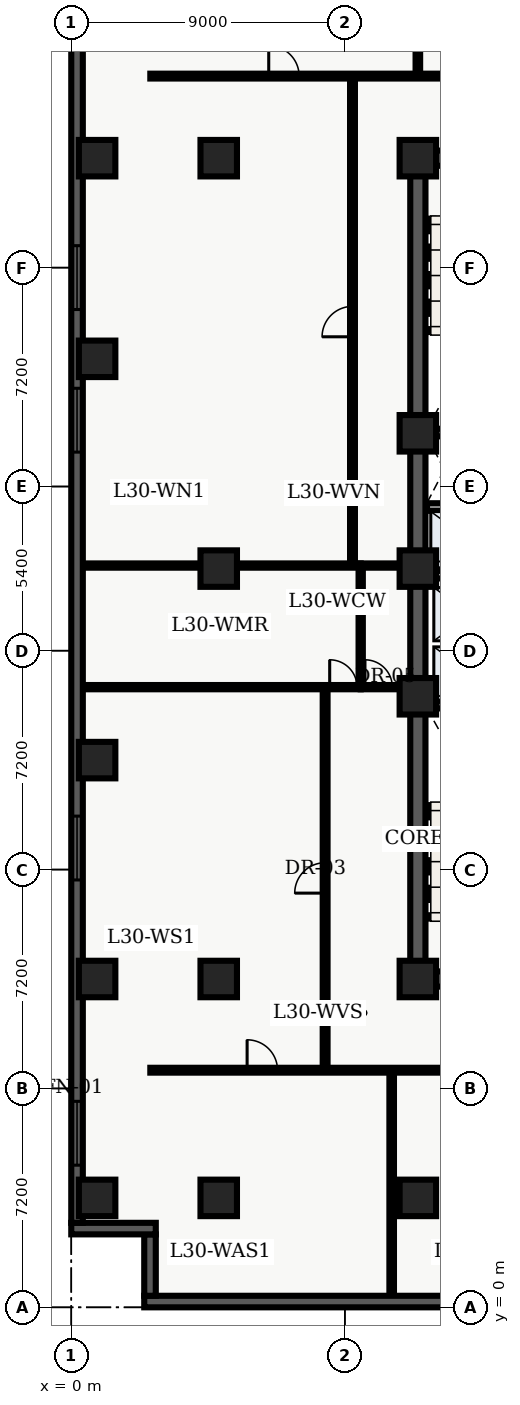
"""IFC4 building model, lengths in metres.
Left out: names, types, materials, properties, quantities, classifications, styles, units other than length and angle.
Written with IfcOpenShell. Run it as: python <this file> out.ifc"""

import sys

from ifc_helpers import new_model, entity, si_unit, converted_unit, direction, frame, origin_with_axes, origin_2d_with_axis, place, context, subcontext, project, spatial, polyline, rectangle, outline, extrude, element, fill, save


model = new_model("IFC4")
c1 = context("Model", 3, precision=1e-05, world=origin_with_axes(), true_north=direction((0.0, 1.0)))
c2 = subcontext(c1, "Body", "Model", "MODEL_VIEW")
j1 = project(units=[si_unit("LENGTHUNIT", "METRE"), converted_unit("PLANEANGLEUNIT", "DEGREE", entity("IfcPlaneAngleMeasure", 0.017), si_unit("PLANEANGLEUNIT", "RADIAN"), dimensions=[0, 0, 0, 0, 0, 0, 0])], contexts=[c1])
p1 = place(None, origin_with_axes())
s1 = spatial("IfcSite", under=j1, at=p1, CompositionType="ELEMENT")
p2 = place(p1, origin_with_axes())
s2 = spatial("IfcBuilding", under=s1, at=p2, CompositionType="ELEMENT")
p3 = place(p2, frame((0.0, 0.0, 124.2), z_axis=(0.0, 0.0, 1.0), x_axis=(1.0, 0.0, 0.0)))
s3 = spatial("IfcBuildingStorey", under=s2, at=p3, CompositionType="ELEMENT", Elevation=124.2)
p4 = place(p3, frame((11.4, 10.8, 0.0), z_axis=(0.0, 0.0, 1.0), x_axis=(0.0, 1.0, 0.0)))
e1 = element("IfcWall", 1, at=p4, inside=s3, PredefinedType="SHEAR", context=c2, shape_type="SweptSolid", body=[
    extrude(outline(polyline([(0.0, -0.25), (27.0, -0.25), (27.0, 0.25), (0.0, 0.25), (0.0, -0.25)])), origin_with_axes(), (0.0, 0.0, 1.0), 4.56),
])
p5 = place(p3, frame((11.4, 10.8, 0.0), z_axis=(0.0, 0.0, 1.0), x_axis=(1.0, 0.0, 0.0)))
e2 = element("IfcWall", 2, at=p5, inside=s3, PredefinedType="SHEAR", context=c2, shape_type="SweptSolid", body=[
    extrude(outline(polyline([(0.0, -0.25), (7.2, -0.25), (7.2, 0.25), (0.0, 0.25), (0.0, -0.25)])), origin_with_axes(), (0.0, 0.0, 1.0), 4.56),
])
p6 = place(p5, frame((2.625, 0.0, 0.0), z_axis=(0.0, 0.0, 1.0), x_axis=(1.0, 0.0, 0.0)))
e3 = element("IfcOpeningElement", 3, at=p6, cuts=e2, PredefinedType="OPENING", context=c2, shape_type="SweptSolid", body=[
    extrude(rectangle(XDim=1.05, YDim=0.52, at=origin_2d_with_axis()), origin_with_axes(), (0.0, 0.0, 1.0), 2.15),
])
p7 = place(p3, frame((11.4, 37.8, 0.0), z_axis=(0.0, 0.0, 1.0), x_axis=(1.0, 0.0, 0.0)))
e4 = element("IfcWall", 4, at=p7, inside=s3, PredefinedType="SHEAR", context=c2, shape_type="SweptSolid", body=[
    extrude(outline(polyline([(0.0, -0.25), (7.2, -0.25), (7.2, 0.25), (0.0, 0.25), (0.0, -0.25)])), origin_with_axes(), (0.0, 0.0, 1.0), 4.56),
])
p8 = place(p7, frame((2.625, 0.0, 0.0), z_axis=(0.0, 0.0, 1.0), x_axis=(1.0, 0.0, 0.0)))
e5 = element("IfcOpeningElement", 5, at=p8, cuts=e4, PredefinedType="OPENING", context=c2, shape_type="SweptSolid", body=[
    extrude(rectangle(XDim=1.05, YDim=0.52, at=origin_2d_with_axis()), origin_with_axes(), (0.0, 0.0, 1.0), 2.15),
])
for number, where, z_axis, x_axis in (
    (6, (11.65, 19.825, 0.0), (0.0, 0.0, 1.0), (1.0, 0.0, 0.0)),
    (7, (11.65, 28.775, 0.0), (0.0, 0.0, 1.0), (1.0, 0.0, 0.0)),
):
    element("IfcWall", number, at=place(p3, frame(where, z_axis=z_axis, x_axis=x_axis)), inside=s3, PredefinedType="SHEAR", context=c2, shape_type="SweptSolid", body=[
        extrude(outline(polyline([(0.0, -0.125), (6.7, -0.125), (6.7, 0.125), (0.0, 0.125), (0.0, -0.125)])), origin_with_axes(), (0.0, 0.0, 1.0), 4.56),
    ])
p9 = place(p3, frame((11.7, 24.1, 0.0), z_axis=(0.0, 0.0, 1.0), x_axis=(1.0, 0.0, 0.0)))
e8 = element("IfcWall", 8, at=p9, inside=s3, PredefinedType="SOLIDWALL", context=c2, shape_type="SweptSolid", body=[
    extrude(outline(polyline([(0.0, -0.125), (6.6, -0.125), (6.6, 0.125), (0.0, 0.125), (0.0, -0.125)])), origin_with_axes(), (0.0, 0.0, 1.0), 3.6),
])
p10 = place(p9, frame((3.75, 0.0, 0.0), z_axis=(0.0, 0.0, 1.0), x_axis=(1.0, 0.0, 0.0)))
e9 = element("IfcOpeningElement", 9, at=p10, cuts=e8, PredefinedType="OPENING", context=c2, shape_type="SweptSolid", body=[
    extrude(rectangle(XDim=0.9, YDim=0.27, at=origin_2d_with_axis()), origin_with_axes(), (0.0, 0.0, 1.0), 2.15),
])
p11 = place(p3, frame((11.7, 26.325, 0.0), z_axis=(0.0, 0.0, 1.0), x_axis=(1.0, 0.0, 0.0)))
e10 = element("IfcWall", 10, at=p11, inside=s3, PredefinedType="SOLIDWALL", context=c2, shape_type="SweptSolid", body=[
    extrude(outline(polyline([(0.0, -0.125), (6.6, -0.125), (6.6, 0.125), (0.0, 0.125), (0.0, -0.125)])), origin_with_axes(), (0.0, 0.0, 1.0), 3.6),
])
p12 = place(p11, frame((3.5, 0.0, 0.0), z_axis=(0.0, 0.0, 1.0), x_axis=(1.0, 0.0, 0.0)))
e11 = element("IfcOpeningElement", 11, at=p12, cuts=e10, PredefinedType="OPENING", context=c2, shape_type="SweptSolid", body=[
    extrude(rectangle(XDim=0.9, YDim=0.27, at=origin_2d_with_axis()), origin_with_axes(), (0.0, 0.0, 1.0), 2.15),
])
for number, where, z_axis, x_axis in (
    (12, (11.4, 3.6, 0.0), (0.0, 0.0, 1.0), (1.0, 0.0, 0.0)),
    (13, (11.4, 10.8, 0.0), (0.0, 0.0, 1.0), (1.0, 0.0, 0.0)),
    (14, (11.4, 20.1, 0.0), (0.0, 0.0, 1.0), (1.0, 0.0, 0.0)),
    (15, (11.4, 24.3, 0.0), (0.0, 0.0, 1.0), (1.0, 0.0, 0.0)),
    (16, (11.4, 28.75, 0.0), (0.0, 0.0, 1.0), (1.0, 0.0, 0.0)),
    (17, (11.4, 37.8, 0.0), (0.0, 0.0, 1.0), (1.0, 0.0, 0.0)),
    (18, (4.85, 3.6, 0.0), (0.0, 0.0, 1.0), (1.0, 0.0, 0.0)),
    (19, (4.85, 10.8, 0.0), (0.0, 0.0, 1.0), (1.0, 0.0, 0.0)),
    (20, (4.85, 24.3, 0.0), (0.0, 0.0, 1.0), (1.0, 0.0, 0.0)),
    (21, (4.85, 37.8, 0.0), (0.0, 0.0, 1.0), (1.0, 0.0, 0.0)),
    (22, (0.85, 3.6, 0.0), (0.0, 0.0, 1.0), (1.0, 0.0, 0.0)),
    (23, (0.85, 10.8, 0.0), (0.0, 0.0, 1.0), (1.0, 0.0, 0.0)),
    (24, (0.85, 18.0, 0.0), (0.0, 0.0, 1.0), (1.0, 0.0, 0.0)),
    (25, (0.85, 31.2, 0.0), (0.0, 0.0, 1.0), (1.0, 0.0, 0.0)),
    (26, (0.85, 37.8, 0.0), (0.0, 0.0, 1.0), (1.0, 0.0, 0.0)),
):
    element("IfcColumn", number, at=place(p3, frame(where, z_axis=z_axis, x_axis=x_axis)), inside=s3, PredefinedType="COLUMN", context=c2, shape_type="SweptSolid", body=[
        extrude(rectangle(XDim=1.2, YDim=1.2, at=origin_2d_with_axis()), origin_with_axes(), (0.0, 0.0, 1.0), 4.8),
    ])
p13 = place(p3, frame((9.52, 20.4, 0.0), z_axis=(0.0, 0.0, 1.0), x_axis=(0.0, 1.0, 0.0)))
e27 = element("IfcWall", 27, at=p13, inside=s3, PredefinedType="PARTITIONING", context=c2, shape_type="SweptSolid", body=[
    extrude(outline(polyline([(0.0, -0.07), (4.0, -0.07), (4.0, 0.07), (0.0, 0.07), (0.0, -0.07)])), origin_with_axes(), (0.0, 0.0, 1.0), 3.2),
])
p14 = place(p3, frame((9.52, 20.4, 0.0), z_axis=(0.0, 0.0, 1.0), x_axis=(1.0, 0.0, 0.0)))
e28 = element("IfcWall", 28, at=p14, inside=s3, PredefinedType="PARTITIONING", context=c2, shape_type="SweptSolid", body=[
    extrude(outline(polyline([(0.0, -0.07), (1.58, -0.07), (1.58, 0.07), (0.0, 0.07), (0.0, -0.07)])), origin_with_axes(), (0.0, 0.0, 1.0), 3.2),
])
p15 = place(p14, frame((0.59, 0.0, 0.0), z_axis=(0.0, 0.0, 1.0), x_axis=(1.0, 0.0, 0.0)))
e29 = element("IfcOpeningElement", 29, at=p15, cuts=e28, PredefinedType="OPENING", context=c2, shape_type="SweptSolid", body=[
    extrude(rectangle(XDim=0.9, YDim=0.16, at=origin_2d_with_axis()), origin_with_axes(), (0.0, 0.0, 1.0), 2.15),
])
p16 = place(p3, frame((9.52, 24.4, 0.0), z_axis=(0.0, 0.0, 1.0), x_axis=(1.0, 0.0, 0.0)))
e30 = element("IfcWall", 30, at=p16, inside=s3, PredefinedType="PARTITIONING", context=c2, shape_type="SweptSolid", body=[
    extrude(outline(polyline([(0.0, -0.07), (1.58, -0.07), (1.58, 0.07), (0.0, 0.07), (0.0, -0.07)])), origin_with_axes(), (0.0, 0.0, 1.0), 3.2),
])
p17 = place(p3, frame((2.6, 7.8, 0.0), z_axis=(0.0, 0.0, 1.0), x_axis=(1.0, 0.0, 0.0)))
e31 = element("IfcWall", 31, at=p17, inside=s3, PredefinedType="PARTITIONING", context=c2, shape_type="SweptSolid", body=[
    extrude(outline(polyline([(0.0, -0.08), (18.55, -0.08), (18.55, 0.08), (0.0, 0.08), (0.0, -0.08)])), origin_with_axes(), (0.0, 0.0, 1.0), 3.2),
])
p18 = place(p17, frame((3.684, 0.0, 0.0), z_axis=(0.0, 0.0, 1.0), x_axis=(1.0, 0.0, 0.0)))
e32 = element("IfcOpeningElement", 32, at=p18, cuts=e31, PredefinedType="OPENING", context=c2, shape_type="SweptSolid", body=[
    extrude(rectangle(XDim=1.0, YDim=0.18, at=origin_2d_with_axis()), origin_with_axes(), (0.0, 0.0, 1.0), 2.15),
])
p19 = place(p17, frame((13.22, 0.0, 0.0), z_axis=(0.0, 0.0, 1.0), x_axis=(1.0, 0.0, 0.0)))
e33 = element("IfcOpeningElement", 33, at=p19, cuts=e31, PredefinedType="OPENING", context=c2, shape_type="SweptSolid", body=[
    extrude(rectangle(XDim=1.0, YDim=0.18, at=origin_2d_with_axis()), origin_with_axes(), (0.0, 0.0, 1.0), 2.15),
])
p20 = place(p3, frame((2.6, 40.5, 0.0), z_axis=(0.0, 0.0, 1.0), x_axis=(1.0, 0.0, 0.0)))
e34 = element("IfcWall", 34, at=p20, inside=s3, PredefinedType="PARTITIONING", context=c2, shape_type="SweptSolid", body=[
    extrude(outline(polyline([(0.0, -0.08), (18.65, -0.08), (18.65, 0.08), (0.0, 0.08), (0.0, -0.08)])), origin_with_axes(), (0.0, 0.0, 1.0), 3.2),
])
p21 = place(p20, frame((4.395, 0.0, 0.0), z_axis=(0.0, 0.0, 1.0), x_axis=(1.0, 0.0, 0.0)))
e35 = element("IfcOpeningElement", 35, at=p21, cuts=e34, PredefinedType="OPENING", context=c2, shape_type="SweptSolid", body=[
    extrude(rectangle(XDim=1.0, YDim=0.18, at=origin_2d_with_axis()), origin_with_axes(), (0.0, 0.0, 1.0), 2.15),
])
p22 = place(p20, frame((12.61, 0.0, 0.0), z_axis=(0.0, 0.0, 1.0), x_axis=(1.0, 0.0, 0.0)))
e36 = element("IfcOpeningElement", 36, at=p22, cuts=e34, PredefinedType="OPENING", context=c2, shape_type="SweptSolid", body=[
    extrude(rectangle(XDim=1.0, YDim=0.18, at=origin_2d_with_axis()), origin_with_axes(), (0.0, 0.0, 1.0), 2.15),
])
p23 = place(p3, frame((8.35, 7.8, 0.0), z_axis=(0.0, 0.0, 1.0), x_axis=(0.0, 1.0, 0.0)))
e37 = element("IfcWall", 37, at=p23, inside=s3, PredefinedType="PARTITIONING", context=c2, shape_type="SweptSolid", body=[
    extrude(outline(polyline([(0.0, -0.08), (12.6, -0.08), (12.6, 0.08), (0.0, 0.08), (0.0, -0.08)])), origin_with_axes(), (0.0, 0.0, 1.0), 3.2),
])
p24 = place(p23, frame((6.325, 0.0, 0.0), z_axis=(0.0, 0.0, 1.0), x_axis=(1.0, 0.0, 0.0)))
e38 = element("IfcOpeningElement", 38, at=p24, cuts=e37, PredefinedType="OPENING", context=c2, shape_type="SweptSolid", body=[
    extrude(rectangle(XDim=1.0, YDim=0.18, at=origin_2d_with_axis()), origin_with_axes(), (0.0, 0.0, 1.0), 2.15),
])
p25 = place(p3, frame((9.25, 24.4, 0.0), z_axis=(0.0, 0.0, 1.0), x_axis=(0.0, 1.0, 0.0)))
e39 = element("IfcWall", 39, at=p25, inside=s3, PredefinedType="PARTITIONING", context=c2, shape_type="SweptSolid", body=[
    extrude(outline(polyline([(0.0, -0.08), (16.1, -0.08), (16.1, 0.08), (0.0, 0.08), (0.0, -0.08)])), origin_with_axes(), (0.0, 0.0, 1.0), 3.2),
])
p26 = place(p25, frame((8.025, 0.0, 0.0), z_axis=(0.0, 0.0, 1.0), x_axis=(1.0, 0.0, 0.0)))
e40 = element("IfcOpeningElement", 40, at=p26, cuts=e39, PredefinedType="OPENING", context=c2, shape_type="SweptSolid", body=[
    extrude(rectangle(XDim=1.0, YDim=0.18, at=origin_2d_with_axis()), origin_with_axes(), (0.0, 0.0, 1.0), 2.15),
])
p27 = place(p3, frame((0.36, 20.4, 0.0), z_axis=(0.0, 0.0, 1.0), x_axis=(1.0, 0.0, 0.0)))
e41 = element("IfcWall", 41, at=p27, inside=s3, PredefinedType="PARTITIONING", context=c2, shape_type="SweptSolid", body=[
    extrude(outline(polyline([(0.0, -0.07), (9.16, -0.07), (9.16, 0.07), (0.0, 0.07), (0.0, -0.07)])), origin_with_axes(), (0.0, 0.0, 1.0), 3.2),
])
p28 = place(p27, frame((8.59, 0.0, 0.0), z_axis=(0.0, 0.0, 1.0), x_axis=(1.0, 0.0, 0.0)))
e42 = element("IfcOpeningElement", 42, at=p28, cuts=e41, PredefinedType="OPENING", context=c2, shape_type="SweptSolid", body=[
    extrude(rectangle(XDim=0.9, YDim=0.16, at=origin_2d_with_axis()), origin_with_axes(), (0.0, 0.0, 1.0), 2.15),
])
p29 = place(p3, frame((0.36, 24.4, 0.0), z_axis=(0.0, 0.0, 1.0), x_axis=(1.0, 0.0, 0.0)))
e43 = element("IfcWall", 43, at=p29, inside=s3, PredefinedType="PARTITIONING", context=c2, shape_type="SweptSolid", body=[
    extrude(outline(polyline([(0.0, -0.07), (9.16, -0.07), (9.16, 0.07), (0.0, 0.07), (0.0, -0.07)])), origin_with_axes(), (0.0, 0.0, 1.0), 3.2),
])
p30 = place(p3, frame((10.539, 0.36, 0.0), z_axis=(0.0, 0.0, 1.0), x_axis=(0.0, 1.0, 0.0)))
e44 = element("IfcWall", 44, at=p30, inside=s3, PredefinedType="PARTITIONING", context=c2, shape_type="SweptSolid", body=[
    extrude(outline(polyline([(0.0, -0.075), (7.34, -0.075), (7.34, 0.075), (0.0, 0.075), (0.0, -0.075)])), origin_with_axes(), (0.0, 0.0, 1.0), 3.2),
])
p31 = place(p3, frame((11.4, 40.6, 0.0), z_axis=(0.0, 0.0, 1.0), x_axis=(0.0, 1.0, 0.0)))
e45 = element("IfcWall", 45, at=p31, inside=s3, PredefinedType="PARTITIONING", context=c2, shape_type="SweptSolid", body=[
    extrude(outline(polyline([(0.0, -0.075), (7.64, -0.075), (7.64, 0.075), (0.0, 0.075), (0.0, -0.075)])), origin_with_axes(), (0.0, 0.0, 1.0), 3.2),
])
p32 = place(p3, frame((57.22, 0.19, 0.0), z_axis=(0.0, 0.0, 1.0), x_axis=(-1.0, 0.0, 0.0)))
e46 = element("IfcWall", 46, at=p32, inside=s3, PredefinedType="SOLIDWALL", context=c2, shape_type="SweptSolid", body=[
    extrude(outline(polyline([(0.0, -0.19), (54.82, -0.19), (54.82, 0.19), (0.0, 0.19), (0.0, -0.19)])), origin_with_axes(), (0.0, 0.0, 1.0), 4.56),
])
p33 = place(p3, frame((2.59, 0.38, 0.0), z_axis=(0.0, 0.0, 1.0), x_axis=(0.0, 1.0, 0.0)))
e47 = element("IfcWall", 47, at=p33, inside=s3, PredefinedType="SOLIDWALL", context=c2, shape_type="SweptSolid", body=[
    extrude(outline(polyline([(0.0, -0.19), (2.02, -0.19), (2.02, 0.19), (0.0, 0.19), (0.0, -0.19)])), origin_with_axes(), (0.0, 0.0, 1.0), 4.56),
])
p34 = place(p3, frame((2.78, 2.59, 0.0), z_axis=(0.0, 0.0, 1.0), x_axis=(-1.0, 0.0, 0.0)))
e48 = element("IfcWall", 48, at=p34, inside=s3, PredefinedType="SOLIDWALL", context=c2, shape_type="SweptSolid", body=[
    extrude(outline(polyline([(0.0, -0.19), (2.78, -0.19), (2.78, 0.19), (0.0, 0.19), (0.0, -0.19)])), origin_with_axes(), (0.0, 0.0, 1.0), 4.56),
])
p35 = place(p3, frame((0.19, 2.78, 0.0), z_axis=(0.0, 0.0, 1.0), x_axis=(0.0, 1.0, 0.0)))
e49 = element("IfcWall", 49, at=p35, inside=s3, PredefinedType="SOLIDWALL", context=c2, shape_type="SweptSolid", body=[
    extrude(outline(polyline([(0.0, -0.19), (43.42, -0.19), (43.42, 0.19), (0.0, 0.19), (0.0, -0.19)])), origin_with_axes(), (0.0, 0.0, 1.0), 4.56),
])
p36 = place(p35, frame((2.946, 0.0, 0.45), z_axis=(0.0, 0.0, 1.0), x_axis=(1.0, 0.0, 0.0)))
e50 = element("IfcOpeningElement", 50, at=p36, cuts=e49, PredefinedType="OPENING", context=c2, shape_type="SweptSolid", body=[
    extrude(rectangle(XDim=2.1, YDim=0.4, at=origin_2d_with_axis()), origin_with_axes(), (0.0, 0.0, 1.0), 2.2),
])
p37 = place(p35, frame((12.328, 0.0, 0.45), z_axis=(0.0, 0.0, 1.0), x_axis=(1.0, 0.0, 0.0)))
e51 = element("IfcOpeningElement", 51, at=p37, cuts=e49, PredefinedType="OPENING", context=c2, shape_type="SweptSolid", body=[
    extrude(rectangle(XDim=2.1, YDim=0.4, at=origin_2d_with_axis()), origin_with_axes(), (0.0, 0.0, 1.0), 2.2),
])
p38 = place(p35, frame((26.401, 0.0, 0.45), z_axis=(0.0, 0.0, 1.0), x_axis=(1.0, 0.0, 0.0)))
e52 = element("IfcOpeningElement", 52, at=p38, cuts=e49, PredefinedType="OPENING", context=c2, shape_type="SweptSolid", body=[
    extrude(rectangle(XDim=2.1, YDim=0.4, at=origin_2d_with_axis()), origin_with_axes(), (0.0, 0.0, 1.0), 2.2),
])
p39 = place(p35, frame((31.092, 0.0, 0.45), z_axis=(0.0, 0.0, 1.0), x_axis=(1.0, 0.0, 0.0)))
e53 = element("IfcOpeningElement", 53, at=p39, cuts=e49, PredefinedType="OPENING", context=c2, shape_type="SweptSolid", body=[
    extrude(rectangle(XDim=2.1, YDim=0.4, at=origin_2d_with_axis()), origin_with_axes(), (0.0, 0.0, 1.0), 2.2),
])
p40 = place(p35, frame((40.024, 0.0, 0.45), z_axis=(0.0, 0.0, 1.0), x_axis=(1.0, 0.0, 0.0)))
e54 = element("IfcOpeningElement", 54, at=p40, cuts=e49, PredefinedType="OPENING", context=c2, shape_type="SweptSolid", body=[
    extrude(rectangle(XDim=2.1, YDim=0.4, at=origin_2d_with_axis()), origin_with_axes(), (0.0, 0.0, 1.0), 2.2),
])
p41 = place(p14, frame((0.59, 0.0, 0.0), z_axis=(0.0, 0.0, 1.0), x_axis=(1.0, 0.0, 0.0)))
e55 = element("IfcDoor", 55, at=p41, inside=s3, OperationType="SINGLE_SWING_LEFT", PredefinedType="DOOR", context=c2, shape_type="SweptSolid", body=[
    extrude(rectangle(XDim=0.9, YDim=0.084, at=origin_2d_with_axis()), origin_with_axes(), (0.0, 0.0, 1.0), 2.15),
])
fill(e29, e55)
p42 = place(p27, frame((8.59, 0.0, 0.0), z_axis=(0.0, 0.0, 1.0), x_axis=(1.0, 0.0, 0.0)))
e56 = element("IfcDoor", 56, at=p42, inside=s3, OperationType="SINGLE_SWING_LEFT", PredefinedType="DOOR", context=c2, shape_type="SweptSolid", body=[
    extrude(rectangle(XDim=0.9, YDim=0.084, at=origin_2d_with_axis()), origin_with_axes(), (0.0, 0.0, 1.0), 2.15),
])
fill(e42, e56)
p43 = place(p23, frame((6.325, 0.0, 0.0), z_axis=(0.0, 0.0, 1.0), x_axis=(1.0, 0.0, 0.0)))
e57 = element("IfcDoor", 57, at=p43, inside=s3, OperationType="SINGLE_SWING_LEFT", PredefinedType="DOOR", context=c2, shape_type="SweptSolid", body=[
    extrude(rectangle(XDim=1.0, YDim=0.09, at=origin_2d_with_axis()), origin_with_axes(), (0.0, 0.0, 1.0), 2.15),
])
fill(e38, e57)
p44 = place(p25, frame((8.025, 0.0, 0.0), z_axis=(0.0, 0.0, 1.0), x_axis=(1.0, 0.0, 0.0)))
e58 = element("IfcDoor", 58, at=p44, inside=s3, OperationType="SINGLE_SWING_LEFT", PredefinedType="DOOR", context=c2, shape_type="SweptSolid", body=[
    extrude(rectangle(XDim=1.0, YDim=0.09, at=origin_2d_with_axis()), origin_with_axes(), (0.0, 0.0, 1.0), 2.15),
])
fill(e40, e58)
p45 = place(p17, frame((3.684, 0.0, 0.0), z_axis=(0.0, 0.0, 1.0), x_axis=(1.0, 0.0, 0.0)))
e59 = element("IfcDoor", 59, at=p45, inside=s3, OperationType="SINGLE_SWING_LEFT", PredefinedType="DOOR", context=c2, shape_type="SweptSolid", body=[
    extrude(rectangle(XDim=1.0, YDim=0.09, at=origin_2d_with_axis()), origin_with_axes(), (0.0, 0.0, 1.0), 2.15),
])
fill(e32, e59)
p46 = place(p20, frame((4.395, 0.0, 0.0), z_axis=(0.0, 0.0, 1.0), x_axis=(1.0, 0.0, 0.0)))
e60 = element("IfcDoor", 60, at=p46, inside=s3, OperationType="SINGLE_SWING_LEFT", PredefinedType="DOOR", context=c2, shape_type="SweptSolid", body=[
    extrude(rectangle(XDim=1.0, YDim=0.09, at=origin_2d_with_axis()), origin_with_axes(), (0.0, 0.0, 1.0), 2.15),
])
fill(e35, e60)
p47 = place(p35, frame((2.946, 0.0, 0.45), z_axis=(0.0, 0.0, 1.0), x_axis=(1.0, 0.0, 0.0)))
e61 = element("IfcWindow", 61, at=p47, inside=s3, PredefinedType="WINDOW", context=c2, shape_type="SweptSolid", body=[
    extrude(rectangle(XDim=2.1, YDim=0.09, at=origin_2d_with_axis()), origin_with_axes(), (0.0, 0.0, 1.0), 2.2),
])
fill(e50, e61)
p48 = place(p35, frame((12.328, 0.0, 0.45), z_axis=(0.0, 0.0, 1.0), x_axis=(1.0, 0.0, 0.0)))
e62 = element("IfcWindow", 62, at=p48, inside=s3, PredefinedType="WINDOW", context=c2, shape_type="SweptSolid", body=[
    extrude(rectangle(XDim=2.1, YDim=0.09, at=origin_2d_with_axis()), origin_with_axes(), (0.0, 0.0, 1.0), 2.2),
])
fill(e51, e62)
p49 = place(p35, frame((26.401, 0.0, 0.45), z_axis=(0.0, 0.0, 1.0), x_axis=(1.0, 0.0, 0.0)))
e63 = element("IfcWindow", 63, at=p49, inside=s3, PredefinedType="WINDOW", context=c2, shape_type="SweptSolid", body=[
    extrude(rectangle(XDim=2.1, YDim=0.09, at=origin_2d_with_axis()), origin_with_axes(), (0.0, 0.0, 1.0), 2.2),
])
fill(e52, e63)
p50 = place(p35, frame((31.092, 0.0, 0.45), z_axis=(0.0, 0.0, 1.0), x_axis=(1.0, 0.0, 0.0)))
e64 = element("IfcWindow", 64, at=p50, inside=s3, PredefinedType="WINDOW", context=c2, shape_type="SweptSolid", body=[
    extrude(rectangle(XDim=2.1, YDim=0.09, at=origin_2d_with_axis()), origin_with_axes(), (0.0, 0.0, 1.0), 2.2),
])
fill(e53, e64)
save(model, sys.argv[1])
